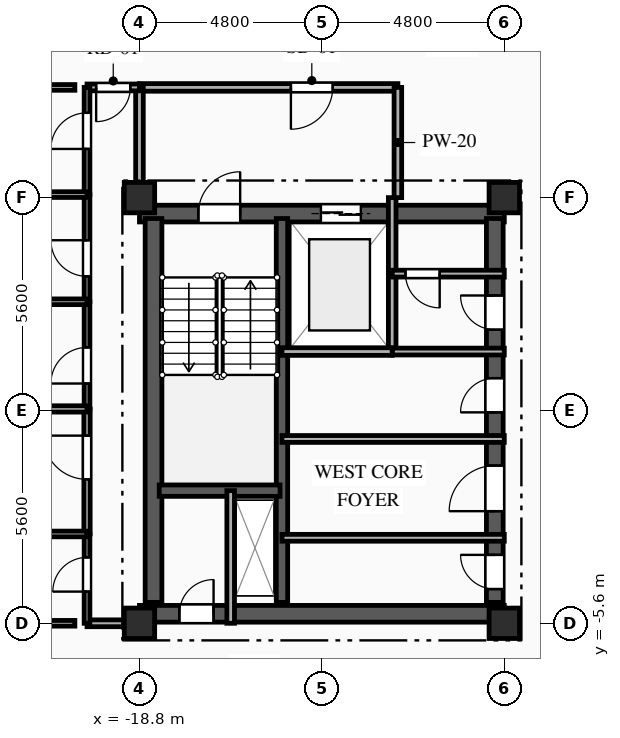
"""IFC4 building model, lengths in metres.
Left out: names, types, materials, properties, quantities, classifications, styles, units other than length and angle.
Written with IfcOpenShell. Run it as: python <this file> out.ifc"""

import sys

from ifc_helpers import new_model, si_unit, direction, frame, frame_2d, origin, origin_2d, place, context, subcontext, project, spatial, rectangle, extrude, element, fill, save


model = new_model("IFC4")
c1 = context("Model", 3, precision=1e-05, world=origin(), true_north=direction((0.0, 1.0)))
c2 = subcontext(c1, "Body", "Model", "MODEL_VIEW")
j1 = project(units=[si_unit("LENGTHUNIT", "METRE"), si_unit("PLANEANGLEUNIT", "RADIAN")], contexts=[c1])
p1 = place(None, origin())
s1 = spatial("IfcSite", under=j1, at=p1, CompositionType="ELEMENT")
p2 = place(p1, origin())
s2 = spatial("IfcBuilding", under=s1, at=p2, CompositionType="ELEMENT")
p3 = place(p2, frame((0.0, 0.0, 248.4)))
s3 = spatial("IfcBuildingStorey", under=s2, at=p3, CompositionType="ELEMENT", Elevation=248.4)
for number, where, z_axis, x_axis in (
    (1, (-18.8, -5.6, 0.0), (0.0, 0.0, 1.0), (1.0, 0.0, 0.0)),
    (2, (-18.8, 5.6, 0.0), (0.0, 0.0, 1.0), (1.0, 0.0, 0.0)),
    (3, (-9.2, -5.6, 0.0), (0.0, 0.0, 1.0), (1.0, 0.0, 0.0)),
    (4, (-9.2, 5.6, 0.0), (0.0, 0.0, 1.0), (1.0, 0.0, 0.0)),
):
    element("IfcColumn", number, at=place(p3, frame(where, z_axis=z_axis, x_axis=x_axis)), inside=s3, PredefinedType="COLUMN", context=c2, shape_type="SweptSolid", body=[
        extrude(rectangle(XDim=0.8, YDim=0.8, at=origin_2d()), origin(), (0.0, 0.0, 1.0), 3.35),
    ])
p4 = place(p3, frame((-18.8, 5.18, 0.0), z_axis=(0.0, 0.0, 1.0), x_axis=(1.0, 0.0, 0.0)))
e5 = element("IfcWall", 5, at=p4, inside=s3, PredefinedType="SHEAR", context=c2, shape_type="SweptSolid", body=[
    extrude(rectangle(XDim=9.6, YDim=0.44, at=frame_2d((4.8, 0.0))), origin(), (0.0, 0.0, 1.0), 3.04),
])
p5 = place(p4, frame((1.55, 0.0, 0.0)))
e6 = element("IfcOpeningElement", 6, at=p5, cuts=e5, PredefinedType="OPENING", context=c2, shape_type="SweptSolid", body=[
    extrude(rectangle(XDim=1.1, YDim=2.15, at=frame_2d((0.55, 1.075))), frame((0.0, 0.23, 0.0), z_axis=(0.0, -1.0, 0.0), x_axis=(1.0, 0.0, 0.0)), (0.0, 0.0, 1.0), 0.46),
])
p6 = place(p4, frame((4.775, 0.0, 0.0)))
e7 = element("IfcOpeningElement", 7, at=p6, cuts=e5, PredefinedType="OPENING", context=c2, shape_type="SweptSolid", body=[
    extrude(rectangle(XDim=1.05, YDim=2.1, at=frame_2d((0.525, 1.05))), frame((0.0, 0.23, 0.0), z_axis=(0.0, -1.0, 0.0), x_axis=(1.0, 0.0, 0.0)), (0.0, 0.0, 1.0), 0.46),
])
p7 = place(p3, frame((-18.8, -5.35, 0.0), z_axis=(0.0, 0.0, 1.0), x_axis=(1.0, 0.0, 0.0)))
e8 = element("IfcWall", 8, at=p7, inside=s3, PredefinedType="SHEAR", context=c2, shape_type="SweptSolid", body=[
    extrude(rectangle(XDim=9.6, YDim=0.44, at=frame_2d((4.8, 0.0))), origin(), (0.0, 0.0, 1.0), 3.04),
])
p8 = place(p7, frame((1.05, 0.0, 0.0)))
e9 = element("IfcOpeningElement", 9, at=p8, cuts=e8, PredefinedType="OPENING", context=c2, shape_type="SweptSolid", body=[
    extrude(rectangle(XDim=0.9, YDim=2.1, at=frame_2d((0.45, 1.05))), frame((0.0, 0.23, 0.0), z_axis=(0.0, -1.0, 0.0), x_axis=(1.0, 0.0, 0.0)), (0.0, 0.0, 1.0), 0.46),
])
p9 = place(p3, frame((-18.43, -5.05, 0.0), z_axis=(0.0, 0.0, 1.0), x_axis=(0.0, 1.0, 0.0)))
e10 = element("IfcWall", 10, at=p9, inside=s3, PredefinedType="SHEAR", context=c2, shape_type="SweptSolid", body=[
    extrude(rectangle(XDim=10.1, YDim=0.44, at=frame_2d((5.05, 0.0))), origin(), (0.0, 0.0, 1.0), 3.04),
])
p10 = place(p3, frame((-9.45, -5.05, 0.0), z_axis=(0.0, 0.0, 1.0), x_axis=(0.0, 1.0, 0.0)))
e11 = element("IfcWall", 11, at=p10, inside=s3, PredefinedType="SHEAR", context=c2, shape_type="SweptSolid", body=[
    extrude(rectangle(XDim=10.1, YDim=0.44, at=frame_2d((5.05, 0.0))), origin(), (0.0, 0.0, 1.0), 3.04),
])
p11 = place(p10, frame((7.175, 0.0, 0.0)))
e12 = element("IfcOpeningElement", 12, at=p11, cuts=e11, PredefinedType="OPENING", context=c2, shape_type="SweptSolid", body=[
    extrude(rectangle(XDim=0.9, YDim=2.1, at=frame_2d((0.45, 1.05))), frame((0.0, 0.23, 0.0), z_axis=(0.0, -1.0, 0.0), x_axis=(1.0, 0.0, 0.0)), (0.0, 0.0, 1.0), 0.46),
])
p12 = place(p10, frame((2.4, 0.0, 0.0)))
e13 = element("IfcOpeningElement", 13, at=p12, cuts=e11, PredefinedType="OPENING", context=c2, shape_type="SweptSolid", body=[
    extrude(rectangle(XDim=1.2, YDim=2.15, at=frame_2d((0.6, 1.075))), frame((0.0, 0.23, 0.0), z_axis=(0.0, -1.0, 0.0), x_axis=(1.0, 0.0, 0.0)), (0.0, 0.0, 1.0), 0.46),
])
p13 = place(p10, frame((0.35, 0.0, 0.0)))
e14 = element("IfcOpeningElement", 14, at=p13, cuts=e11, PredefinedType="OPENING", context=c2, shape_type="SweptSolid", body=[
    extrude(rectangle(XDim=0.9, YDim=2.1, at=frame_2d((0.45, 1.05))), frame((0.0, 0.23, 0.0), z_axis=(0.0, -1.0, 0.0), x_axis=(1.0, 0.0, 0.0)), (0.0, 0.0, 1.0), 0.46),
])
p14 = place(p10, frame((5.0, 0.0, 0.0)))
e15 = element("IfcOpeningElement", 15, at=p14, cuts=e11, PredefinedType="OPENING", context=c2, shape_type="SweptSolid", body=[
    extrude(rectangle(XDim=0.9, YDim=2.1, at=frame_2d((0.45, 1.05))), frame((0.0, 0.23, 0.0), z_axis=(0.0, -1.0, 0.0), x_axis=(1.0, 0.0, 0.0)), (0.0, 0.0, 1.0), 0.46),
])
p15 = place(p3, frame((-15.05, -5.05, 0.0), z_axis=(0.0, 0.0, 1.0), x_axis=(0.0, 1.0, 0.0)))
e16 = element("IfcWall", 16, at=p15, inside=s3, PredefinedType="SHEAR", context=c2, shape_type="SweptSolid", body=[
    extrude(rectangle(XDim=10.1, YDim=0.3, at=frame_2d((5.05, 0.0))), origin(), (0.0, 0.0, 1.0), 3.04),
])
p16 = place(p3, frame((-18.28, -2.11, 0.0), z_axis=(0.0, 0.0, 1.0), x_axis=(1.0, 0.0, 0.0)))
e17 = element("IfcWall", 17, at=p16, inside=s3, PredefinedType="SHEAR", context=c2, shape_type="SweptSolid", body=[
    extrude(rectangle(XDim=3.18, YDim=0.3, at=frame_2d((1.59, 0.0))), origin(), (0.0, 0.0, 1.0), 3.04),
])
p17 = place(p3, frame((-16.4, -5.6, 0.0), z_axis=(0.0, 0.0, 1.0), x_axis=(0.0, 1.0, 0.0)))
e18 = element("IfcWall", 18, at=p17, inside=s3, PredefinedType="PARTITIONING", context=c2, shape_type="SweptSolid", body=[
    extrude(rectangle(XDim=3.49, YDim=0.2, at=frame_2d((1.745, 0.0))), origin(), (0.0, 0.0, 1.0), 3.04),
])
p18 = place(p3, frame((-12.15, 1.55, 0.0), z_axis=(0.0, 0.0, 1.0), x_axis=(0.0, 1.0, 0.0)))
e19 = element("IfcWall", 19, at=p18, inside=s3, PredefinedType="PARTITIONING", context=c2, shape_type="SweptSolid", body=[
    extrude(rectangle(XDim=2.05, YDim=0.2, at=frame_2d((1.025, 0.0))), origin(), (0.0, 0.0, 1.0), 3.04),
])
p19 = place(p3, frame((-12.15, 3.6, 0.0), z_axis=(0.0, 0.0, 1.0), x_axis=(0.0, 1.0, 0.0)))
e20 = element("IfcWall", 20, at=p19, inside=s3, PredefinedType="PARTITIONING", context=c2, shape_type="SweptSolid", body=[
    extrude(rectangle(XDim=2.0, YDim=0.2, at=frame_2d((1.0, 0.0))), origin(), (0.0, 0.0, 1.0), 3.04),
])
p20 = place(p3, frame((-12.0, 8.5, 0.0), z_axis=(0.0, 0.0, 1.0), x_axis=(-1.0, 0.0, 0.0)))
e21 = element("IfcWall", 21, at=p20, inside=s3, PredefinedType="PARTITIONING", context=c2, shape_type="SweptSolid", body=[
    extrude(rectangle(XDim=6.8, YDim=0.2, at=frame_2d((3.4, 0.0))), origin(), (0.0, 0.0, 1.0), 3.04),
])
p21 = place(p20, frame((1.715, 0.0, 0.0)))
e22 = element("IfcOpeningElement", 22, at=p21, cuts=e21, PredefinedType="OPENING", context=c2, shape_type="SweptSolid", body=[
    extrude(rectangle(XDim=1.1, YDim=2.15, at=frame_2d((0.55, 1.075))), frame((0.0, 0.11, 0.0), z_axis=(0.0, -1.0, 0.0), x_axis=(1.0, 0.0, 0.0)), (0.0, 0.0, 1.0), 0.22),
])
p22 = place(p3, frame((-12.0, 5.6, 0.0), z_axis=(0.0, 0.0, 1.0), x_axis=(0.0, 1.0, 0.0)))
e23 = element("IfcWall", 23, at=p22, inside=s3, PredefinedType="PARTITIONING", context=c2, shape_type="SweptSolid", body=[
    extrude(rectangle(XDim=2.9, YDim=0.2, at=frame_2d((1.45, 0.0))), origin(), (0.0, 0.0, 1.0), 3.04),
])
p23 = place(p3, frame((-18.8, 8.5, 0.0), z_axis=(0.0, 0.0, 1.0), x_axis=(0.0, -1.0, 0.0)))
e24 = element("IfcWall", 24, at=p23, inside=s3, PredefinedType="PARTITIONING", context=c2, shape_type="SweptSolid", body=[
    extrude(rectangle(XDim=2.9, YDim=0.2, at=frame_2d((1.45, 0.0))), origin(), (0.0, 0.0, 1.0), 2.665),
])
p24 = place(p3, frame((-9.2, 3.6, 0.0), z_axis=(0.0, 0.0, 1.0), x_axis=(-1.0, 0.0, 0.0)))
e25 = element("IfcWall", 25, at=p24, inside=s3, PredefinedType="PARTITIONING", context=c2, shape_type="SweptSolid", body=[
    extrude(rectangle(XDim=2.95, YDim=0.18, at=frame_2d((1.475, 0.0))), origin(), (0.0, 0.0, 1.0), 3.04),
])
p25 = place(p24, frame((1.7, 0.0, 0.0)))
e26 = element("IfcOpeningElement", 26, at=p25, cuts=e25, PredefinedType="OPENING", context=c2, shape_type="SweptSolid", body=[
    extrude(rectangle(XDim=0.9, YDim=2.1, at=frame_2d((0.45, 1.05))), frame((0.0, 0.1, 0.0), z_axis=(0.0, -1.0, 0.0), x_axis=(1.0, 0.0, 0.0)), (0.0, 0.0, 1.0), 0.2),
])
p26 = place(p3, frame((-12.15, 1.55, 0.0), z_axis=(0.0, 0.0, 1.0), x_axis=(1.0, 0.0, 0.0)))
e27 = element("IfcWall", 27, at=p26, inside=s3, PredefinedType="PARTITIONING", context=c2, shape_type="SweptSolid", body=[
    extrude(rectangle(XDim=2.95, YDim=0.18, at=frame_2d((1.475, 0.0))), origin(), (0.0, 0.0, 1.0), 3.04),
])
p27 = place(p3, frame((-15.05, -3.35, 0.0), z_axis=(0.0, 0.0, 1.0), x_axis=(1.0, 0.0, 0.0)))
e28 = element("IfcWall", 28, at=p27, inside=s3, PredefinedType="PARTITIONING", context=c2, shape_type="SweptSolid", body=[
    extrude(rectangle(XDim=5.85, YDim=0.18, at=frame_2d((2.925, 0.0))), origin(), (0.0, 0.0, 1.0), 2.755),
])
p28 = place(p3, frame((-9.2, -0.75, 0.0), z_axis=(0.0, 0.0, 1.0), x_axis=(-1.0, 0.0, 0.0)))
e29 = element("IfcWall", 29, at=p28, inside=s3, PredefinedType="PARTITIONING", context=c2, shape_type="SweptSolid", body=[
    extrude(rectangle(XDim=5.85, YDim=0.18, at=frame_2d((2.925, 0.0))), origin(), (0.0, 0.0, 1.0), 3.04),
])
p29 = place(p3, frame((-18.8, 8.5, 0.0), z_axis=(0.0, 0.0, 1.0), x_axis=(-1.0, 0.0, 0.0)))
e30 = element("IfcWall", 30, at=p29, inside=s3, PredefinedType="PARTITIONING", context=c2, shape_type="SweptSolid", body=[
    extrude(rectangle(XDim=1.38, YDim=0.18, at=frame_2d((0.69, 0.0))), origin(), (0.0, 0.0, 1.0), 3.04),
])
p30 = place(p29, frame((0.24, 0.0, 0.0)))
e31 = element("IfcOpeningElement", 31, at=p30, cuts=e30, PredefinedType="OPENING", context=c2, shape_type="SweptSolid", body=[
    extrude(rectangle(XDim=0.9, YDim=2.1, at=frame_2d((0.45, 1.05))), frame((0.0, 0.1, 0.0), z_axis=(0.0, -1.0, 0.0), x_axis=(1.0, 0.0, 0.0)), (0.0, 0.0, 1.0), 0.2),
])
p31 = place(p3, frame((-20.5, 8.5, 0.0), z_axis=(0.0, 0.0, 1.0), x_axis=(-1.0, 0.0, 0.0)))
e32 = element("IfcWall", 32, at=p31, inside=s3, PredefinedType="PARTITIONING", context=c2, shape_type="SweptSolid", body=[
    extrude(rectangle(XDim=0.7, YDim=0.15, at=frame_2d((0.35, 0.0))), origin(), (0.0, 0.0, 1.0), 3.04),
])
p32 = place(p3, frame((-20.18, -5.6, 0.0), z_axis=(0.0, 0.0, 1.0), x_axis=(1.0, 0.0, 0.0)))
e33 = element("IfcWall", 33, at=p32, inside=s3, PredefinedType="PARTITIONING", context=c2, shape_type="SweptSolid", body=[
    extrude(rectangle(XDim=1.38, YDim=0.18, at=frame_2d((0.69, 0.0))), origin(), (0.0, 0.0, 1.0), 3.04),
])
p33 = place(p3, frame((-21.2, -5.6, 0.0), z_axis=(0.0, 0.0, 1.0), x_axis=(1.0, 0.0, 0.0)))
e34 = element("IfcWall", 34, at=p33, inside=s3, PredefinedType="PLUMBINGWALL", context=c2, shape_type="SweptSolid", body=[
    extrude(rectangle(XDim=0.7, YDim=0.15, at=frame_2d((0.35, 0.0))), origin(), (0.0, 0.0, 1.0), 3.04),
])
p34 = place(p3, frame((-20.18, -5.6, 0.0), z_axis=(0.0, 0.0, 1.0), x_axis=(0.0, 1.0, 0.0)))
e35 = element("IfcWall", 35, at=p34, inside=s3, PredefinedType="PLUMBINGWALL", context=c2, shape_type="SweptSolid", body=[
    extrude(rectangle(XDim=2.35, YDim=0.15, at=frame_2d((1.175, 0.0))), origin(), (0.0, 0.0, 1.0), 3.04),
])
p35 = place(p34, frame((0.834, 0.0, 0.0)))
e36 = element("IfcOpeningElement", 36, at=p35, cuts=e35, PredefinedType="OPENING", context=c2, shape_type="SweptSolid", body=[
    extrude(rectangle(XDim=0.9, YDim=2.1, at=frame_2d((0.45, 1.05))), frame((0.0, 0.085, 0.0), z_axis=(0.0, -1.0, 0.0), x_axis=(1.0, 0.0, 0.0)), (0.0, 0.0, 1.0), 0.17),
])
p36 = place(p3, frame((-20.18, -3.25, 0.0), z_axis=(0.0, 0.0, 1.0), x_axis=(0.0, 1.0, 0.0)))
e37 = element("IfcWall", 37, at=p36, inside=s3, PredefinedType="PARTITIONING", context=c2, shape_type="SweptSolid", body=[
    extrude(rectangle(XDim=3.29, YDim=0.165, at=frame_2d((1.645, 0.0))), origin(), (0.0, 0.0, 1.0), 3.04),
])
p37 = place(p36, frame((1.438, 0.0, 0.0)))
e38 = element("IfcOpeningElement", 38, at=p37, cuts=e37, PredefinedType="OPENING", context=c2, shape_type="SweptSolid", body=[
    extrude(rectangle(XDim=1.15, YDim=2.15, at=frame_2d((0.575, 1.075))), frame((0.0, 0.093, 0.0), z_axis=(0.0, -1.0, 0.0), x_axis=(1.0, 0.0, 0.0)), (0.0, 0.0, 1.0), 0.185),
])
p38 = place(p3, frame((-20.18, 0.04, 0.0), z_axis=(0.0, 0.0, 1.0), x_axis=(0.0, 1.0, 0.0)))
e39 = element("IfcWall", 39, at=p38, inside=s3, PredefinedType="PARTITIONING", context=c2, shape_type="SweptSolid", body=[
    extrude(rectangle(XDim=2.82, YDim=0.15, at=frame_2d((1.41, 0.0))), origin(), (0.0, 0.0, 1.0), 3.04),
])
p39 = place(p38, frame((0.669, 0.0, 0.0)))
e40 = element("IfcOpeningElement", 40, at=p39, cuts=e39, PredefinedType="OPENING", context=c2, shape_type="SweptSolid", body=[
    extrude(rectangle(XDim=0.95, YDim=2.1, at=frame_2d((0.475, 1.05))), frame((0.0, 0.085, 0.0), z_axis=(0.0, -1.0, 0.0), x_axis=(1.0, 0.0, 0.0)), (0.0, 0.0, 1.0), 0.17),
])
p40 = place(p3, frame((-20.18, 2.86, 0.0), z_axis=(0.0, 0.0, 1.0), x_axis=(0.0, 1.0, 0.0)))
e41 = element("IfcWall", 41, at=p40, inside=s3, PredefinedType="PARTITIONING", context=c2, shape_type="SweptSolid", body=[
    extrude(rectangle(XDim=2.82, YDim=0.15, at=frame_2d((1.41, 0.0))), origin(), (0.0, 0.0, 1.0), 3.04),
])
p41 = place(p40, frame((0.669, 0.0, 0.0)))
e42 = element("IfcOpeningElement", 42, at=p41, cuts=e41, PredefinedType="OPENING", context=c2, shape_type="SweptSolid", body=[
    extrude(rectangle(XDim=0.95, YDim=2.1, at=frame_2d((0.475, 1.05))), frame((0.0, 0.085, 0.0), z_axis=(0.0, -1.0, 0.0), x_axis=(1.0, 0.0, 0.0)), (0.0, 0.0, 1.0), 0.17),
])
p42 = place(p3, frame((-20.18, 5.68, 0.0), z_axis=(0.0, 0.0, 1.0), x_axis=(0.0, 1.0, 0.0)))
e43 = element("IfcWall", 43, at=p42, inside=s3, PredefinedType="PARTITIONING", context=c2, shape_type="SweptSolid", body=[
    extrude(rectangle(XDim=2.82, YDim=0.15, at=frame_2d((1.41, 0.0))), origin(), (0.0, 0.0, 1.0), 3.04),
])
p43 = place(p42, frame((1.201, 0.0, 0.0)))
e44 = element("IfcOpeningElement", 44, at=p43, cuts=e43, PredefinedType="OPENING", context=c2, shape_type="SweptSolid", body=[
    extrude(rectangle(XDim=0.95, YDim=2.1, at=frame_2d((0.475, 1.05))), frame((0.0, 0.085, 0.0), z_axis=(0.0, -1.0, 0.0), x_axis=(1.0, 0.0, 0.0)), (0.0, 0.0, 1.0), 0.17),
])
p44 = place(p3, frame((-24.0, -3.25, 0.0), z_axis=(0.0, 0.0, 1.0), x_axis=(1.0, 0.0, 0.0)))
e45 = element("IfcWall", 45, at=p44, inside=s3, PredefinedType="PLUMBINGWALL", context=c2, shape_type="SweptSolid", body=[
    extrude(rectangle(XDim=3.82, YDim=0.15, at=frame_2d((1.91, 0.0))), origin(), (0.0, 0.0, 1.0), 3.04),
])
p45 = place(p3, frame((-24.0, 0.04, 0.0), z_axis=(0.0, 0.0, 1.0), x_axis=(1.0, 0.0, 0.0)))
e46 = element("IfcWall", 46, at=p45, inside=s3, PredefinedType="PARTITIONING", context=c2, shape_type="SweptSolid", body=[
    extrude(rectangle(XDim=3.82, YDim=0.165, at=frame_2d((1.91, 0.0))), origin(), (0.0, 0.0, 1.0), 3.04),
])
p46 = place(p3, frame((-24.0, 2.86, 0.0), z_axis=(0.0, 0.0, 1.0), x_axis=(1.0, 0.0, 0.0)))
e47 = element("IfcWall", 47, at=p46, inside=s3, PredefinedType="PARTITIONING", context=c2, shape_type="SweptSolid", body=[
    extrude(rectangle(XDim=3.82, YDim=0.15, at=frame_2d((1.91, 0.0))), origin(), (0.0, 0.0, 1.0), 2.665),
])
p47 = place(p3, frame((-24.0, 5.68, 0.0), z_axis=(0.0, 0.0, 1.0), x_axis=(1.0, 0.0, 0.0)))
e48 = element("IfcWall", 48, at=p47, inside=s3, PredefinedType="PARTITIONING", context=c2, shape_type="SweptSolid", body=[
    extrude(rectangle(XDim=3.82, YDim=0.15, at=frame_2d((1.91, 0.0))), origin(), (0.0, 0.0, 1.0), 3.04),
])
p48 = place(p3, frame((-15.05, 1.55, 0.0), z_axis=(0.0, 0.0, 1.0), x_axis=(1.0, 0.0, 0.0)))
e49 = element("IfcWall", 49, at=p48, inside=s3, PredefinedType="PARTITIONING", context=c2, shape_type="SweptSolid", body=[
    extrude(rectangle(XDim=2.9, YDim=0.2, at=frame_2d((1.45, 0.0))), origin(), (0.0, 0.0, 1.0), 3.04),
])
p49 = place(p5, origin())
e50 = element("IfcDoor", 50, at=p49, inside=s3, OperationType="SINGLE_SWING_RIGHT", PredefinedType="DOOR", context=c2, shape_type="SweptSolid", body=[
    extrude(rectangle(XDim=1.1, YDim=2.15, at=frame_2d((0.55, 1.075))), frame((0.0, 0.025, 0.0), z_axis=(0.0, -1.0, 0.0), x_axis=(1.0, 0.0, 0.0)), (0.0, 0.0, 1.0), 0.05),
])
fill(e6, e50)
p50 = place(p6, origin())
e51 = element("IfcDoor", 51, at=p50, inside=s3, OperationType="DOUBLE_DOOR_SLIDING", PredefinedType="DOOR", context=c2, shape_type="SweptSolid", body=[
    extrude(rectangle(XDim=1.05, YDim=2.1, at=frame_2d((0.525, 1.05))), frame((0.0, 0.025, 0.0), z_axis=(0.0, -1.0, 0.0), x_axis=(1.0, 0.0, 0.0)), (0.0, 0.0, 1.0), 0.05),
])
fill(e7, e51)
p51 = place(p8, origin())
e52 = element("IfcDoor", 52, at=p51, inside=s3, OperationType="SINGLE_SWING_RIGHT", PredefinedType="DOOR", context=c2, shape_type="SweptSolid", body=[
    extrude(rectangle(XDim=0.9, YDim=2.1, at=frame_2d((0.45, 1.05))), frame((0.0, 0.025, 0.0), z_axis=(0.0, -1.0, 0.0), x_axis=(1.0, 0.0, 0.0)), (0.0, 0.0, 1.0), 0.05),
])
fill(e9, e52)
p52 = place(p21, origin())
e53 = element("IfcDoor", 53, at=p52, inside=s3, OperationType="SINGLE_SWING_RIGHT", PredefinedType="DOOR", context=c2, shape_type="SweptSolid", body=[
    extrude(rectangle(XDim=1.1, YDim=2.15, at=frame_2d((0.55, 1.075))), frame((0.0, 0.025, 0.0), z_axis=(0.0, -1.0, 0.0), x_axis=(1.0, 0.0, 0.0)), (0.0, 0.0, 1.0), 0.05),
])
fill(e22, e53)
p53 = place(p25, origin())
e54 = element("IfcDoor", 54, at=p53, inside=s3, OperationType="SINGLE_SWING_LEFT", PredefinedType="DOOR", context=c2, shape_type="SweptSolid", body=[
    extrude(rectangle(XDim=0.9, YDim=2.1, at=frame_2d((0.45, 1.05))), frame((0.0, 0.025, 0.0), z_axis=(0.0, -1.0, 0.0), x_axis=(1.0, 0.0, 0.0)), (0.0, 0.0, 1.0), 0.05),
])
fill(e26, e54)
p54 = place(p11, origin())
e55 = element("IfcDoor", 55, at=p54, inside=s3, OperationType="SINGLE_SWING_RIGHT", PredefinedType="DOOR", context=c2, shape_type="SweptSolid", body=[
    extrude(rectangle(XDim=0.9, YDim=2.1, at=frame_2d((0.45, 1.05))), frame((0.0, 0.025, 0.0), z_axis=(0.0, -1.0, 0.0), x_axis=(1.0, 0.0, 0.0)), (0.0, 0.0, 1.0), 0.05),
])
fill(e12, e55)
p55 = place(p12, origin())
e56 = element("IfcDoor", 56, at=p55, inside=s3, OperationType="SINGLE_SWING_LEFT", PredefinedType="DOOR", context=c2, shape_type="SweptSolid", body=[
    extrude(rectangle(XDim=1.2, YDim=2.15, at=frame_2d((0.6, 1.075))), frame((0.0, 0.025, 0.0), z_axis=(0.0, -1.0, 0.0), x_axis=(1.0, 0.0, 0.0)), (0.0, 0.0, 1.0), 0.05),
])
fill(e13, e56)
p56 = place(p13, origin())
e57 = element("IfcDoor", 57, at=p56, inside=s3, OperationType="SINGLE_SWING_RIGHT", PredefinedType="DOOR", context=c2, shape_type="SweptSolid", body=[
    extrude(rectangle(XDim=0.9, YDim=2.1, at=frame_2d((0.45, 1.05))), frame((0.0, 0.025, 0.0), z_axis=(0.0, -1.0, 0.0), x_axis=(1.0, 0.0, 0.0)), (0.0, 0.0, 1.0), 0.05),
])
fill(e14, e57)
p57 = place(p14, origin())
e58 = element("IfcDoor", 58, at=p57, inside=s3, OperationType="SINGLE_SWING_LEFT", PredefinedType="DOOR", context=c2, shape_type="SweptSolid", body=[
    extrude(rectangle(XDim=0.9, YDim=2.1, at=frame_2d((0.45, 1.05))), frame((0.0, 0.025, 0.0), z_axis=(0.0, -1.0, 0.0), x_axis=(1.0, 0.0, 0.0)), (0.0, 0.0, 1.0), 0.05),
])
fill(e15, e58)
p58 = place(p30, origin())
e59 = element("IfcDoor", 59, at=p58, inside=s3, OperationType="SINGLE_SWING_RIGHT", PredefinedType="DOOR", context=c2, shape_type="SweptSolid", body=[
    extrude(rectangle(XDim=0.9, YDim=2.1, at=frame_2d((0.45, 1.05))), frame((0.0, 0.025, 0.0), z_axis=(0.0, -1.0, 0.0), x_axis=(1.0, 0.0, 0.0)), (0.0, 0.0, 1.0), 0.05),
])
fill(e31, e59)
p59 = place(p35, origin())
e60 = element("IfcDoor", 60, at=p59, inside=s3, OperationType="SINGLE_SWING_LEFT", PredefinedType="DOOR", context=c2, shape_type="SweptSolid", body=[
    extrude(rectangle(XDim=0.9, YDim=2.1, at=frame_2d((0.45, 1.05))), frame((0.0, 0.025, 0.0), z_axis=(0.0, -1.0, 0.0), x_axis=(1.0, 0.0, 0.0)), (0.0, 0.0, 1.0), 0.05),
])
fill(e36, e60)
p60 = place(p37, origin())
e61 = element("IfcDoor", 61, at=p60, inside=s3, OperationType="SINGLE_SWING_RIGHT", PredefinedType="DOOR", context=c2, shape_type="SweptSolid", body=[
    extrude(rectangle(XDim=1.15, YDim=2.15, at=frame_2d((0.575, 1.075))), frame((0.0, 0.025, 0.0), z_axis=(0.0, -1.0, 0.0), x_axis=(1.0, 0.0, 0.0)), (0.0, 0.0, 1.0), 0.05),
])
fill(e38, e61)
p61 = place(p39, origin())
e62 = element("IfcDoor", 62, at=p61, inside=s3, OperationType="SINGLE_SWING_LEFT", PredefinedType="DOOR", context=c2, shape_type="SweptSolid", body=[
    extrude(rectangle(XDim=0.95, YDim=2.1, at=frame_2d((0.475, 1.05))), frame((0.0, 0.025, 0.0), z_axis=(0.0, -1.0, 0.0), x_axis=(1.0, 0.0, 0.0)), (0.0, 0.0, 1.0), 0.05),
])
fill(e40, e62)
p62 = place(p41, origin())
e63 = element("IfcDoor", 63, at=p62, inside=s3, OperationType="SINGLE_SWING_RIGHT", PredefinedType="DOOR", context=c2, shape_type="SweptSolid", body=[
    extrude(rectangle(XDim=0.95, YDim=2.1, at=frame_2d((0.475, 1.05))), frame((0.0, 0.025, 0.0), z_axis=(0.0, -1.0, 0.0), x_axis=(1.0, 0.0, 0.0)), (0.0, 0.0, 1.0), 0.05),
])
fill(e42, e63)
p63 = place(p43, origin())
e64 = element("IfcDoor", 64, at=p63, inside=s3, OperationType="SINGLE_SWING_LEFT", PredefinedType="DOOR", context=c2, shape_type="SweptSolid", body=[
    extrude(rectangle(XDim=0.95, YDim=2.1, at=frame_2d((0.475, 1.05))), frame((0.0, 0.025, 0.0), z_axis=(0.0, -1.0, 0.0), x_axis=(1.0, 0.0, 0.0)), (0.0, 0.0, 1.0), 0.05),
])
fill(e44, e64)
save(model, sys.argv[1])
